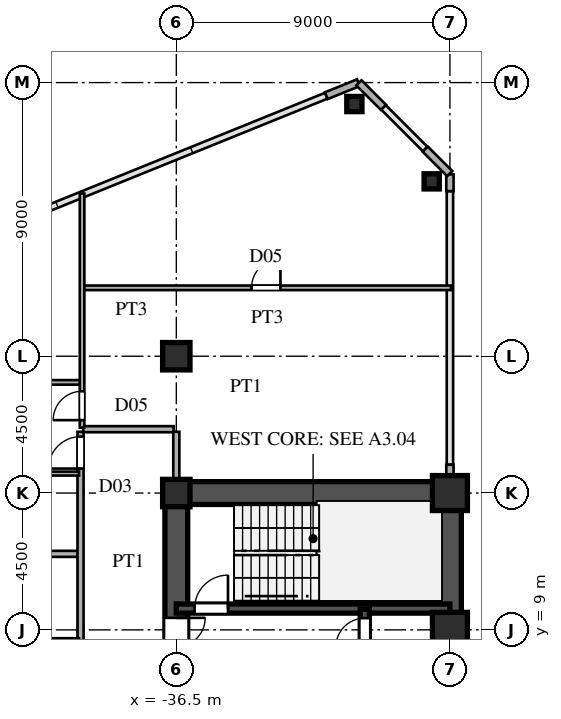
"""IFC4 building model, lengths in metres.
Left out: names, types, materials, properties, quantities, classifications, styles, units other than length and angle.
Written with IfcOpenShell. Run it as: python <this file> out.ifc"""

import sys

from ifc_helpers import new_model, si_unit, direction, frame, frame_2d, origin, origin_2d, place, context, subcontext, project, spatial, rectangle, hollow_rectangle, i_section, extrude, source, transform, mapped, element, fill, save


model = new_model("IFC4")
c1 = context("Model", 3, precision=1e-05, world=origin(), true_north=direction((0.0, 1.0)))
c2 = subcontext(c1, "Body", "Model", "MODEL_VIEW")
j1 = project(units=[si_unit("LENGTHUNIT", "METRE"), si_unit("PLANEANGLEUNIT", "RADIAN")], contexts=[c1])
p1 = place(None, origin())
s1 = spatial("IfcSite", under=j1, at=p1, CompositionType="ELEMENT")
p2 = place(p1, origin())
s2 = spatial("IfcBuilding", under=s1, at=p2, CompositionType="ELEMENT")
p3 = place(p2, frame((0.0, 0.0, 29.7)))
s3 = spatial("IfcBuildingStorey", under=s2, at=p3, CompositionType="ELEMENT", Elevation=29.7)
m1 = source(origin(), c2, "Body", "SweptSolid", [
    extrude(hollow_rectangle(XDim=1.15, YDim=1.15, WallThickness=0.048, at=origin_2d()), origin(), (0.0, 0.0, 1.0), 3.6),
])
for number, where, z_axis, x_axis in (
    (1, (-27.5, 9.0, 0.0), (0.0, 0.0, 1.0), (1.0, 0.0, 0.0)),
    (2, (-27.5, 13.5, 0.0), (0.0, 0.0, 1.0), (1.0, 0.0, 0.0)),
):
    element("IfcColumn", number, at=place(p3, frame(where, z_axis=z_axis, x_axis=x_axis)), inside=s3, PredefinedType="COLUMN", context=c2, shape_type="MappedRepresentation", body=[
        mapped(m1, transform((0.0, 0.0, 0.0), scale=1.0)),
    ])
m2 = source(origin(), c2, "Body", "SweptSolid", [
    extrude(i_section(OverallWidth=0.9, OverallDepth=0.9, WebThickness=0.036, FlangeThickness=0.055, at=origin_2d()), origin(), (0.0, 0.0, 1.0), 3.6),
])
for number, where, z_axis, x_axis in (
    (3, (-36.5, 13.5, 0.0), (0.0, 0.0, 1.0), (1.0, 0.0, 0.0)),
    (4, (-36.5, 18.0, 0.0), (0.0, 0.0, 1.0), (1.0, 0.0, 0.0)),
):
    element("IfcColumn", number, at=place(p3, frame(where, z_axis=z_axis, x_axis=x_axis)), inside=s3, PredefinedType="COLUMN", context=c2, shape_type="MappedRepresentation", body=[
        mapped(m2, transform((0.0, 0.0, 0.0), scale=1.0)),
    ])
m3 = source(origin(), c2, "Body", "SweptSolid", [
    extrude(hollow_rectangle(XDim=0.5, YDim=0.5, WallThickness=0.02, at=origin_2d()), origin(), (0.0, 0.0, 1.0), 3.6),
])
for number, where, z_axis, x_axis in (
    (5, (-28.1, 23.751, 0.0), (0.0, 0.0, 1.0), (1.0, 0.0, 0.0)),
    (6, (-30.643, 26.295, 0.0), (0.0, 0.0, 1.0), (1.0, 0.0, 0.0)),
):
    element("IfcColumn", number, at=place(p3, frame(where, z_axis=z_axis, x_axis=x_axis)), inside=s3, PredefinedType="COLUMN", context=c2, shape_type="MappedRepresentation", body=[
        mapped(m3, transform((0.0, 0.0, 0.0), scale=1.0)),
    ])
p4 = place(p3, frame((-27.5, 13.88, 0.0), z_axis=(0.0, 0.0, 1.0), x_axis=(0.0, 1.0, 0.0)))
e7 = element("IfcWall", 7, at=p4, inside=s3, PredefinedType="SOLIDWALL", context=c2, shape_type="SweptSolid", body=[
    extrude(rectangle(XDim=0.55, YDim=0.24, at=frame_2d((0.275, 0.0))), origin(), (0.0, 0.0, 1.0), 2.88),
])
p5 = place(p3, frame((-27.5, 23.43, 0.0), z_axis=(0.0, 0.0, 1.0), x_axis=(0.0, 1.0, 0.0)))
e8 = element("IfcWall", 8, at=p5, inside=s3, PredefinedType="SOLIDWALL", context=c2, shape_type="SweptSolid", body=[
    extrude(rectangle(XDim=0.55, YDim=0.24, at=frame_2d((0.275, 0.0))), origin(), (0.0, 0.0, 1.0), 3.38),
])
for number, where, z_axis, x_axis in (
    (9, (-27.507, 24.007, 0.0), (0.0, 0.0, 1.0), (-0.707, 0.707, 0.0)),
    (10, (-29.687, 26.187, 0.0), (0.0, 0.0, 1.0), (-0.707, 0.707, 0.0)),
):
    element("IfcWall", number, at=place(p3, frame(where, z_axis=z_axis, x_axis=x_axis)), inside=s3, PredefinedType="SOLIDWALL", context=c2, shape_type="SweptSolid", body=[
        extrude(rectangle(XDim=1.14, YDim=0.24, at=frame_2d((0.57, 0.0))), origin(), (0.0, 0.0, 1.0), 3.38),
    ])
p6 = place(p3, frame((-30.509, 26.996, 0.0), z_axis=(0.0, 0.0, 1.0), x_axis=(-0.927007103665, -0.375043770452, 0.0)))
e11 = element("IfcWall", 11, at=p6, inside=s3, PredefinedType="SOLIDWALL", context=c2, shape_type="SweptSolid", body=[
    extrude(rectangle(XDim=1.14, YDim=0.24, at=frame_2d((0.57, 0.0))), origin(), (0.0, 0.0, 1.0), 3.38),
])
p7 = place(p3, frame((-27.5, 1.3, 0.0), z_axis=(0.0, 0.0, 1.0), x_axis=(0.0, 1.0, 0.0)))
e12 = element("IfcWall", 12, at=p7, inside=s3, PredefinedType="SHEAR", context=c2, shape_type="SweptSolid", body=[
    extrude(rectangle(XDim=12.2, YDim=0.75, at=frame_2d((6.1, 0.0))), origin(), (0.0, 0.0, 1.0), 3.38),
])
p8 = place(p3, frame((-36.5, 13.5, 0.0), z_axis=(0.0, 0.0, 1.0), x_axis=(1.0, 0.0, 0.0)))
e13 = element("IfcWall", 13, at=p8, inside=s3, PredefinedType="SHEAR", context=c2, shape_type="SweptSolid", body=[
    extrude(rectangle(XDim=9.0, YDim=0.75, at=frame_2d((4.5, 0.0))), origin(), (0.0, 0.0, 1.0), 3.38),
])
p9 = place(p3, frame((-36.5, 8.2, 0.0), z_axis=(0.0, 0.0, 1.0), x_axis=(0.0, 1.0, 0.0)))
e14 = element("IfcWall", 14, at=p9, inside=s3, PredefinedType="SHEAR", context=c2, shape_type="SweptSolid", body=[
    extrude(rectangle(XDim=5.45, YDim=0.75, at=frame_2d((2.725, 0.0))), origin(), (0.0, 0.0, 1.0), 3.38),
])
p10 = place(p9, frame((0.245, 0.0, 0.0)))
e15 = element("IfcOpeningElement", 15, at=p10, cuts=e14, PredefinedType="OPENING", context=c2, shape_type="SweptSolid", body=[
    extrude(rectangle(XDim=0.95, YDim=2.15, at=frame_2d((0.475, 1.075))), frame((0.0, 0.385, 0.0), z_axis=(0.0, -1.0, 0.0), x_axis=(1.0, 0.0, 0.0)), (0.0, 0.0, 1.0), 0.77),
])
p11 = place(p3, frame((-36.5, 9.7, 0.0), z_axis=(0.0, 0.0, 1.0), x_axis=(1.0, 0.0, 0.0)))
e16 = element("IfcWall", 16, at=p11, inside=s3, PredefinedType="SHEAR", context=c2, shape_type="SweptSolid", body=[
    extrude(rectangle(XDim=9.0, YDim=0.3, at=frame_2d((4.5, 0.0))), origin(), (0.0, 0.0, 1.0), 3.38),
])
p12 = place(p11, frame((0.6, 0.0, 0.0)))
e17 = element("IfcOpeningElement", 17, at=p12, cuts=e16, PredefinedType="OPENING", context=c2, shape_type="SweptSolid", body=[
    extrude(rectangle(XDim=1.1, YDim=2.2, at=frame_2d((0.55, 1.1))), frame((0.0, 0.16, 0.0), z_axis=(0.0, -1.0, 0.0), x_axis=(1.0, 0.0, 0.0)), (0.0, 0.0, 1.0), 0.32),
])
p13 = place(p3, frame((-30.3, 8.15, 0.0), z_axis=(0.0, 0.0, 1.0), x_axis=(0.0, 1.0, 0.0)))
e18 = element("IfcWall", 18, at=p13, inside=s3, PredefinedType="SHEAR", context=c2, shape_type="SweptSolid", body=[
    extrude(rectangle(XDim=1.53, YDim=0.3, at=frame_2d((0.765, 0.0))), origin(), (0.0, 0.0, 1.0), 3.38),
])
p14 = place(p13, frame((0.285, 0.0, 0.0)))
e19 = element("IfcOpeningElement", 19, at=p14, cuts=e18, PredefinedType="OPENING", context=c2, shape_type="SweptSolid", body=[
    extrude(rectangle(XDim=0.95, YDim=2.15, at=frame_2d((0.475, 1.075))), frame((0.0, 0.16, 0.0), z_axis=(0.0, -1.0, 0.0), x_axis=(1.0, 0.0, 0.0)), (0.0, 0.0, 1.0), 0.32),
])
p15 = place(p3, frame((-44.15, 8.65, 0.0), z_axis=(0.0, 0.0, 1.0), x_axis=(1.0, 0.0, 0.0)))
e20 = element("IfcWall", 20, at=p15, inside=s3, PredefinedType="PARTITIONING", context=c2, shape_type="SweptSolid", body=[
    extrude(rectangle(XDim=4.45, YDim=0.15, at=frame_2d((2.225, 0.0))), origin(), (0.0, 0.0, 1.0), 3.38),
])
p16 = place(p15, frame((1.75, 0.0, 0.0)))
e21 = element("IfcOpeningElement", 21, at=p16, cuts=e20, PredefinedType="OPENING", context=c2, shape_type="SweptSolid", body=[
    extrude(rectangle(XDim=0.95, YDim=2.15, at=frame_2d((0.475, 1.075))), frame((0.0, 0.085, 0.0), z_axis=(0.0, -1.0, 0.0), x_axis=(1.0, 0.0, 0.0)), (0.0, 0.0, 1.0), 0.17),
])
p17 = place(p3, frame((-68.807, 11.5, 0.0), z_axis=(0.0, 0.0, 1.0), x_axis=(1.0, 0.0, 0.0)))
e22 = element("IfcWall", 22, at=p17, inside=s3, PredefinedType="PARTITIONING", context=c2, shape_type="SweptSolid", body=[
    extrude(rectangle(XDim=29.077, YDim=0.2, at=frame_2d((14.539, 0.0))), origin(), (0.0, 0.0, 1.0), 3.38),
])
p18 = place(p3, frame((-44.15, 14.14, 0.0), z_axis=(0.0, 0.0, 1.0), x_axis=(1.0, 0.0, 0.0)))
e23 = element("IfcWall", 23, at=p18, inside=s3, PredefinedType="PARTITIONING", context=c2, shape_type="SweptSolid", body=[
    extrude(rectangle(XDim=4.45, YDim=0.13, at=frame_2d((2.225, 0.0))), origin(), (0.0, 0.0, 1.0), 3.38),
])
p19 = place(p18, frame((1.785, 0.0, 0.0)))
e24 = element("IfcOpeningElement", 24, at=p19, cuts=e23, PredefinedType="OPENING", context=c2, shape_type="SweptSolid", body=[
    extrude(rectangle(XDim=0.88, YDim=2.1, at=frame_2d((0.44, 1.05))), frame((0.0, 0.075, 0.0), z_axis=(0.0, -1.0, 0.0), x_axis=(1.0, 0.0, 0.0)), (0.0, 0.0, 1.0), 0.15),
])
p20 = place(p3, frame((-39.565, 15.6, 0.0), z_axis=(0.0, 0.0, 1.0), x_axis=(1.0, 0.0, 0.0)))
e25 = element("IfcWall", 25, at=p20, inside=s3, PredefinedType="PARTITIONING", context=c2, shape_type="SweptSolid", body=[
    extrude(rectangle(XDim=2.98, YDim=0.2, at=frame_2d((1.49, 0.0))), origin(), (0.0, 0.0, 1.0), 3.38),
])
p21 = place(p3, frame((-44.15, 17.14, 0.0), z_axis=(0.0, 0.0, 1.0), x_axis=(1.0, 0.0, 0.0)))
e26 = element("IfcWall", 26, at=p21, inside=s3, PredefinedType="PARTITIONING", context=c2, shape_type="SweptSolid", body=[
    extrude(rectangle(XDim=4.5, YDim=0.15, at=frame_2d((2.25, 0.0))), origin(), (0.0, 0.0, 1.0), 3.38),
])
p22 = place(p21, frame((1.775, 0.0, 0.0)))
e27 = element("IfcOpeningElement", 27, at=p22, cuts=e26, PredefinedType="OPENING", context=c2, shape_type="SweptSolid", body=[
    extrude(rectangle(XDim=0.95, YDim=2.15, at=frame_2d((0.475, 1.075))), frame((0.0, 0.085, 0.0), z_axis=(0.0, -1.0, 0.0), x_axis=(1.0, 0.0, 0.0)), (0.0, 0.0, 1.0), 0.17),
])
p23 = place(p3, frame((-39.55, 20.25, 0.0), z_axis=(0.0, 0.0, 1.0), x_axis=(1.0, 0.0, 0.0)))
e28 = element("IfcWall", 28, at=p23, inside=s3, PredefinedType="PARTITIONING", context=c2, shape_type="SweptSolid", body=[
    extrude(rectangle(XDim=12.085, YDim=0.15, at=frame_2d((6.042, 0.0))), origin(), (0.0, 0.0, 1.0), 3.38),
])
p24 = place(p23, frame((5.525, 0.0, 0.0)))
e29 = element("IfcOpeningElement", 29, at=p24, cuts=e28, PredefinedType="OPENING", context=c2, shape_type="SweptSolid", body=[
    extrude(rectangle(XDim=0.95, YDim=2.15, at=frame_2d((0.475, 1.075))), frame((0.0, 0.085, 0.0), z_axis=(0.0, -1.0, 0.0), x_axis=(1.0, 0.0, 0.0)), (0.0, 0.0, 1.0), 0.17),
])
p25 = place(p3, frame((-39.65, -15.515, 0.0), z_axis=(0.0, 0.0, 1.0), x_axis=(0.0, 1.0, 0.0)))
e30 = element("IfcWall", 30, at=p25, inside=s3, PredefinedType="PARTITIONING", context=c2, shape_type="SweptSolid", body=[
    extrude(rectangle(XDim=31.03, YDim=0.2, at=frame_2d((15.515, 0.0))), origin(), (0.0, 0.0, 1.0), 3.38),
])
p26 = place(p25, frame((0.16, 0.0, 0.0)))
e31 = element("IfcOpeningElement", 31, at=p26, cuts=e30, PredefinedType="OPENING", context=c2, shape_type="SweptSolid", body=[
    extrude(rectangle(XDim=1.05, YDim=2.25, at=frame_2d((0.525, 1.125))), frame((0.0, 0.11, 0.0), z_axis=(0.0, -1.0, 0.0), x_axis=(1.0, 0.0, 0.0)), (0.0, 0.0, 1.0), 0.22),
])
p27 = place(p25, frame((10.038, 0.0, 0.0)))
e32 = element("IfcOpeningElement", 32, at=p27, cuts=e30, PredefinedType="OPENING", context=c2, shape_type="SweptSolid", body=[
    extrude(rectangle(XDim=1.05, YDim=2.25, at=frame_2d((0.525, 1.125))), frame((0.0, 0.11, 0.0), z_axis=(0.0, -1.0, 0.0), x_axis=(1.0, 0.0, 0.0)), (0.0, 0.0, 1.0), 0.22),
])
p28 = place(p25, frame((21.638, 0.0, 0.0)))
e33 = element("IfcOpeningElement", 33, at=p28, cuts=e30, PredefinedType="OPENING", context=c2, shape_type="SweptSolid", body=[
    extrude(rectangle(XDim=1.05, YDim=2.25, at=frame_2d((0.525, 1.125))), frame((0.0, 0.11, 0.0), z_axis=(0.0, -1.0, 0.0), x_axis=(1.0, 0.0, 0.0)), (0.0, 0.0, 1.0), 0.22),
])
p29 = place(p25, frame((29.82, 0.0, 0.0)))
e34 = element("IfcOpeningElement", 34, at=p29, cuts=e30, PredefinedType="OPENING", context=c2, shape_type="SweptSolid", body=[
    extrude(rectangle(XDim=1.05, YDim=2.25, at=frame_2d((0.525, 1.125))), frame((0.0, 0.11, 0.0), z_axis=(0.0, -1.0, 0.0), x_axis=(1.0, 0.0, 0.0)), (0.0, 0.0, 1.0), 0.22),
])
p30 = place(p3, frame((-39.6, 15.65, 0.0), z_axis=(0.0, 0.0, 1.0), x_axis=(0.0, 1.0, 0.0)))
e35 = element("IfcWall", 35, at=p30, inside=s3, PredefinedType="PARTITIONING", context=c2, shape_type="SweptSolid", body=[
    extrude(rectangle(XDim=7.702, YDim=0.15, at=frame_2d((3.851, 0.0))), origin(), (0.0, 0.0, 1.0), 3.38),
])
p31 = place(p30, frame((0.248, 0.0, 0.0)))
e36 = element("IfcOpeningElement", 36, at=p31, cuts=e35, PredefinedType="OPENING", context=c2, shape_type="SweptSolid", body=[
    extrude(rectangle(XDim=0.95, YDim=2.15, at=frame_2d((0.475, 1.075))), frame((0.0, 0.085, 0.0), z_axis=(0.0, -1.0, 0.0), x_axis=(1.0, 0.0, 0.0)), (0.0, 0.0, 1.0), 0.17),
])
p32 = place(p3, frame((-36.5, 13.88, 0.0), z_axis=(0.0, 0.0, 1.0), x_axis=(0.0, 1.0, 0.0)))
e37 = element("IfcWall", 37, at=p32, inside=s3, PredefinedType="PARTITIONING", context=c2, shape_type="SweptSolid", body=[
    extrude(rectangle(XDim=1.635, YDim=0.2, at=frame_2d((0.817, 0.0))), origin(), (0.0, 0.0, 1.0), 2.68),
])
m4 = source(origin(), c2, "Body", "SweptSolid", [
    extrude(rectangle(XDim=0.95, YDim=2.15, at=frame_2d((0.475, 1.075))), frame((0.0, 0.025, 0.0), z_axis=(0.0, -1.0, 0.0), x_axis=(1.0, 0.0, 0.0)), (0.0, 0.0, 1.0), 0.05),
])
p33 = place(p10, frame((0.95, 0.0, 0.0), z_axis=(0.0, 0.0, 1.0), x_axis=(-1.0, 0.0, 0.0)))
e38 = element("IfcDoor", 38, at=p33, inside=s3, OperationType="SINGLE_SWING_RIGHT", PredefinedType="DOOR", context=c2, shape_type="MappedRepresentation", body=[
    mapped(m4, transform((0.0, 0.0, 0.0), scale=1.0)),
])
fill(e15, e38)
m5 = source(origin(), c2, "Body", "SweptSolid", [
    extrude(rectangle(XDim=1.1, YDim=2.2, at=frame_2d((0.55, 1.1))), frame((0.0, 0.025, 0.0), z_axis=(0.0, -1.0, 0.0), x_axis=(1.0, 0.0, 0.0)), (0.0, 0.0, 1.0), 0.05),
])
p34 = place(p12, origin())
e39 = element("IfcDoor", 39, at=p34, inside=s3, OperationType="SINGLE_SWING_RIGHT", PredefinedType="DOOR", context=c2, shape_type="MappedRepresentation", body=[
    mapped(m5, transform((0.0, 0.0, 0.0), scale=1.0)),
])
fill(e17, e39)
p35 = place(p14, origin())
e40 = element("IfcDoor", 40, at=p35, inside=s3, OperationType="SINGLE_SWING_LEFT", PredefinedType="DOOR", context=c2, shape_type="MappedRepresentation", body=[
    mapped(m4, transform((0.0, 0.0, 0.0), scale=1.0)),
])
fill(e19, e40)
m6 = source(origin(), c2, "Body", "SweptSolid", [
    extrude(rectangle(XDim=0.95, YDim=2.15, at=frame_2d((0.475, 1.075))), frame((0.0, 0.025, 0.0), z_axis=(0.0, -1.0, 0.0), x_axis=(1.0, 0.0, 0.0)), (0.0, 0.0, 1.0), 0.05),
])
p36 = place(p24, origin())
e41 = element("IfcDoor", 41, at=p36, inside=s3, OperationType="SINGLE_SWING_RIGHT", PredefinedType="DOOR", context=c2, shape_type="MappedRepresentation", body=[
    mapped(m6, transform((0.0, 0.0, 0.0), scale=1.0)),
])
fill(e29, e41)
m7 = source(origin(), c2, "Body", "SweptSolid", [
    extrude(rectangle(XDim=1.05, YDim=2.25, at=frame_2d((0.525, 1.125))), frame((0.0, 0.025, 0.0), z_axis=(0.0, -1.0, 0.0), x_axis=(1.0, 0.0, 0.0)), (0.0, 0.0, 1.0), 0.05),
])
p37 = place(p29, origin())
e42 = element("IfcDoor", 42, at=p37, inside=s3, OperationType="SINGLE_SWING_LEFT", PredefinedType="DOOR", context=c2, shape_type="MappedRepresentation", body=[
    mapped(m7, transform((0.0, 0.0, 0.0), scale=1.0)),
])
fill(e34, e42)
p38 = place(p31, origin())
e43 = element("IfcDoor", 43, at=p38, inside=s3, OperationType="SINGLE_SWING_LEFT", PredefinedType="DOOR", context=c2, shape_type="MappedRepresentation", body=[
    mapped(m6, transform((0.0, 0.0, 0.0), scale=1.0)),
])
fill(e36, e43)
save(model, sys.argv[1])
